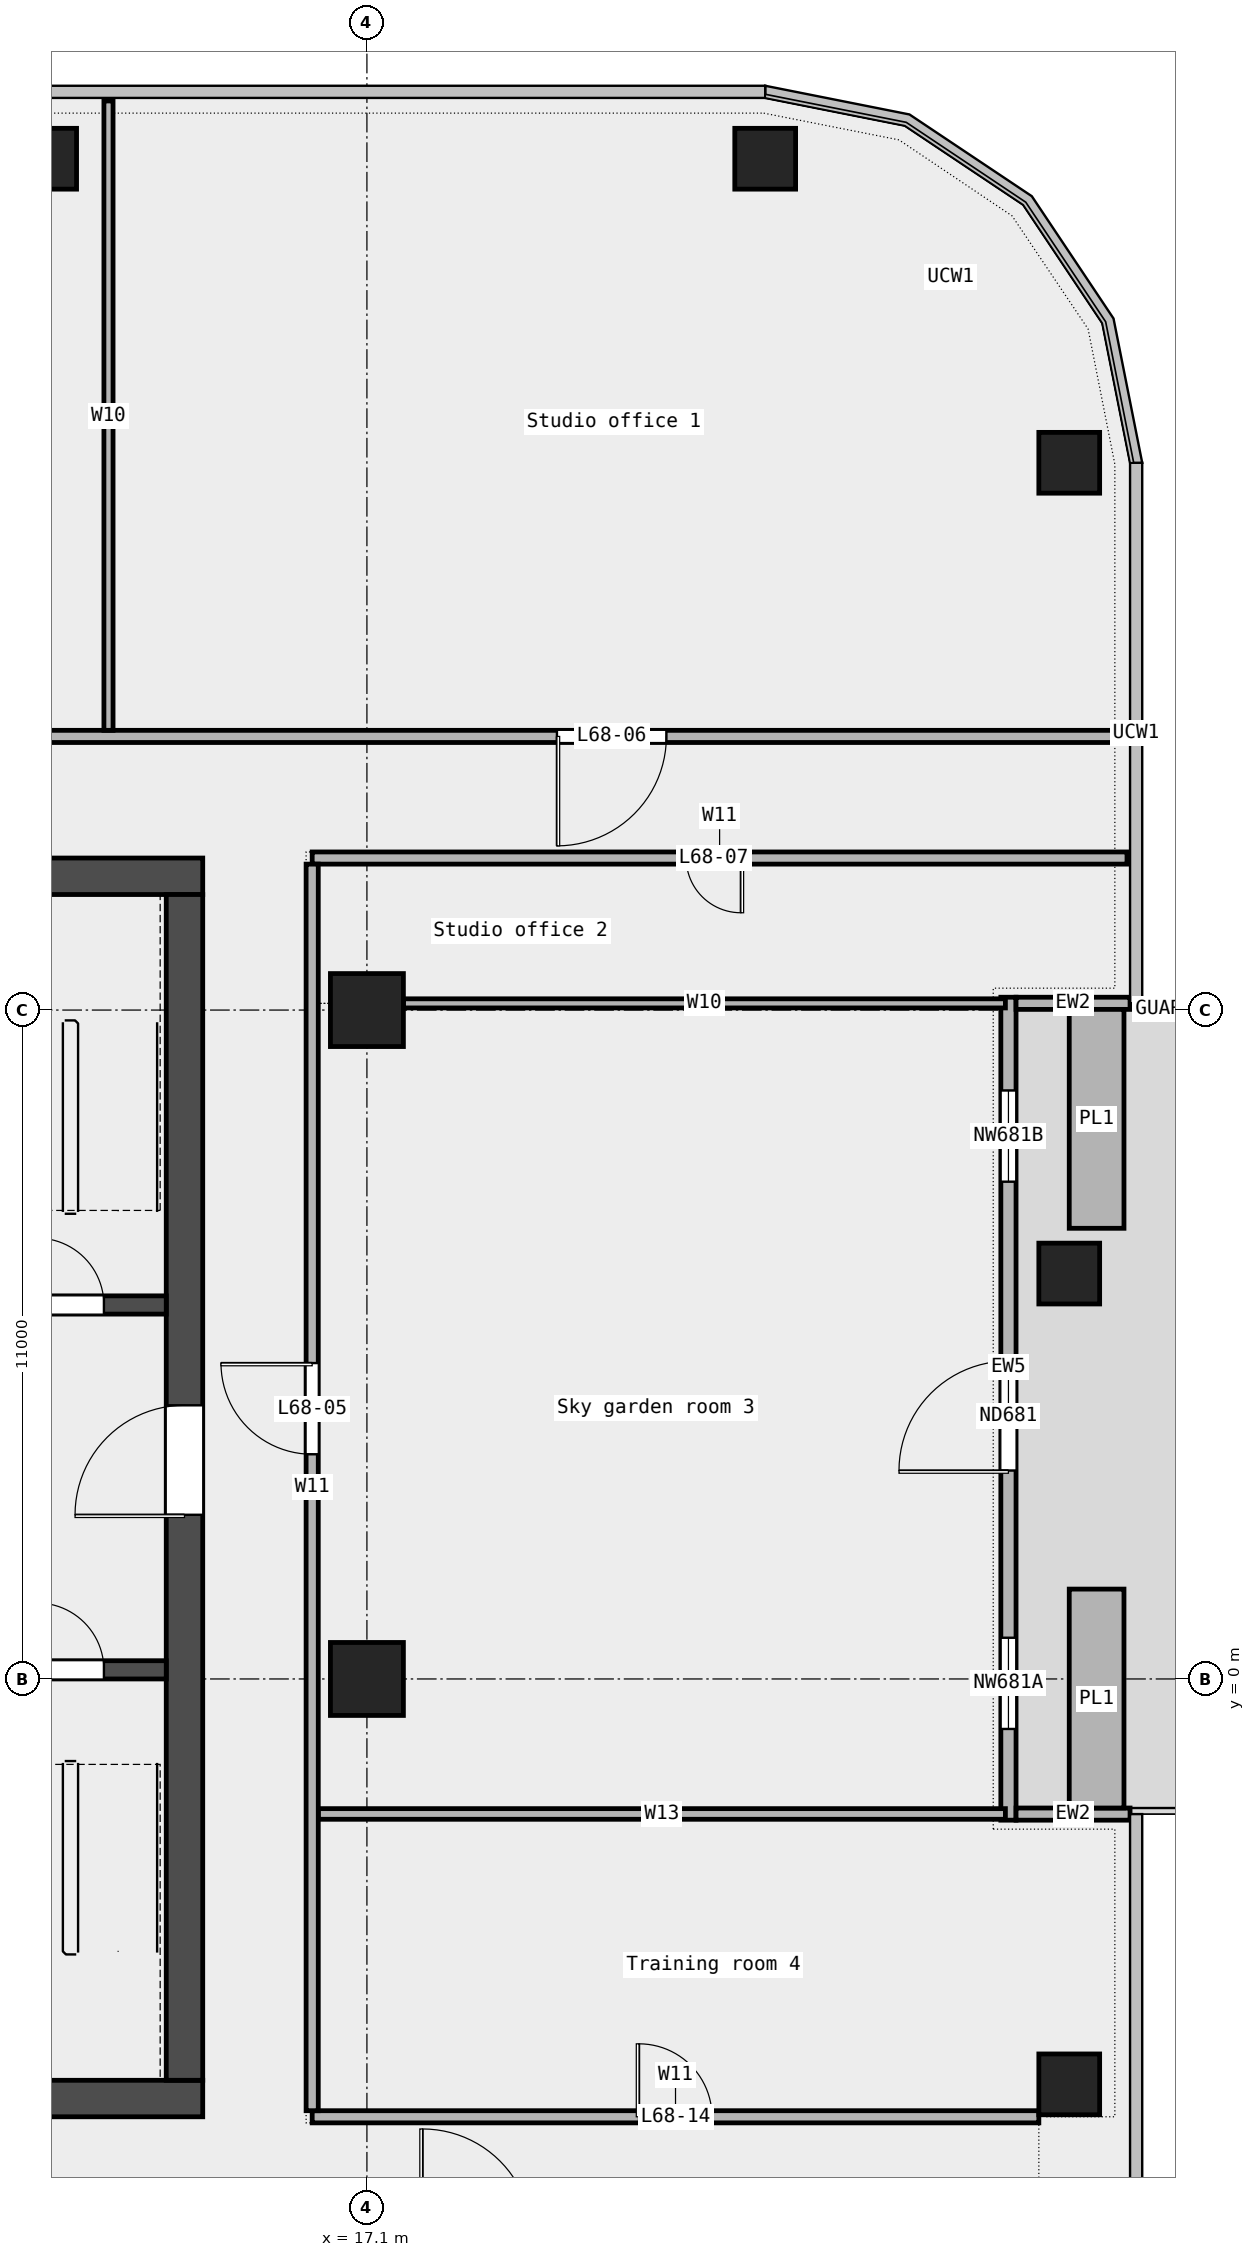
"""IFC4 building model, lengths in metres.
Left out: names, types, materials, properties, quantities, classifications, styles, units other than length and angle.
Written with IfcOpenShell. Run it as: python <this file> out.ifc"""

import sys

from ifc_helpers import new_model, si_unit, direction, frame, frame_2d, origin, origin_2d, place, context, subcontext, project, spatial, rectangle, extrude, element, fill, save


model = new_model("IFC4")
c1 = context("Model", 3, precision=1e-05, world=origin(), true_north=direction((0.0, 1.0)))
c2 = subcontext(c1, "Body", "Model", "MODEL_VIEW")
j1 = project(units=[si_unit("LENGTHUNIT", "METRE"), si_unit("PLANEANGLEUNIT", "RADIAN")], contexts=[c1])
p1 = place(None, origin())
s1 = spatial("IfcSite", under=j1, at=p1, CompositionType="ELEMENT")
p2 = place(p1, origin())
s2 = spatial("IfcBuilding", under=s1, at=p2, CompositionType="ELEMENT")
p3 = place(p2, frame((0.0, 0.0, 311.4)))
s3 = spatial("IfcBuildingStorey", under=s2, at=p3, CompositionType="ELEMENT", Elevation=311.4)
for number, where, z_axis, x_axis in (
    (1, (28.65, -6.667, 0.0), (0.0, 0.0, 1.0), (1.0, 0.0, 0.0)),
    (2, (28.65, 6.667, 0.0), (0.0, 0.0, 1.0), (1.0, 0.0, 0.0)),
    (3, (28.65, 20.0, 0.0), (0.0, 0.0, 1.0), (1.0, 0.0, 0.0)),
    (4, (23.65, 25.0, 0.0), (0.0, 0.0, 1.0), (1.0, 0.0, 0.0)),
    (5, (11.825, 25.0, 0.0), (0.0, 0.0, 1.0), (1.0, 0.0, 0.0)),
):
    element("IfcColumn", number, at=place(p3, frame(where, z_axis=z_axis, x_axis=x_axis)), inside=s3, PredefinedType="COLUMN", context=c2, shape_type="SweptSolid", body=[
        extrude(rectangle(XDim=1.0, YDim=1.0, at=origin_2d()), origin(), (0.0, 0.0, 1.0), 3.4),
    ])
for number, where, z_axis, x_axis in (
    (6, (17.1, 0.0, 0.0), (0.0, 0.0, 1.0), (1.0, 0.0, 0.0)),
    (7, (17.1, 11.0, 0.0), (0.0, 0.0, 1.0), (1.0, 0.0, 0.0)),
):
    element("IfcColumn", number, at=place(p3, frame(where, z_axis=z_axis, x_axis=x_axis)), inside=s3, PredefinedType="COLUMN", context=c2, shape_type="SweptSolid", body=[
        extrude(rectangle(XDim=1.2, YDim=1.2, at=origin_2d()), origin(), (0.0, 0.0, 1.0), 3.4),
    ])
p4 = place(p3, frame((27.65, -2.322, 0.0), z_axis=(0.0, 0.0, 1.0), x_axis=(0.0, 1.0, 0.0)))
e8 = element("IfcWall", 8, at=p4, inside=s3, PredefinedType="STANDARD", context=c2, shape_type="SweptSolid", body=[
    extrude(rectangle(XDim=13.533, YDim=0.25, at=frame_2d((6.767, 0.0))), origin(), (0.0, 0.0, 1.0), 3.4),
])
p5 = place(p4, frame((1.5, 0.0, 0.45)))
e9 = element("IfcOpeningElement", 9, at=p5, cuts=e8, PredefinedType="OPENING", context=c2, shape_type="SweptSolid", body=[
    extrude(rectangle(XDim=1.5, YDim=2.4, at=frame_2d((0.75, 1.2))), frame((0.0, 0.137, 0.0), z_axis=(0.0, -1.0, 0.0), x_axis=(1.0, 0.0, 0.0)), (0.0, 0.0, 1.0), 0.274),
])
p6 = place(p4, frame((5.75, 0.0, 0.0)))
e10 = element("IfcOpeningElement", 10, at=p6, cuts=e8, PredefinedType="OPENING", context=c2, shape_type="SweptSolid", body=[
    extrude(rectangle(XDim=1.8, YDim=2.4, at=frame_2d((0.9, 1.2))), frame((0.0, 0.137, 0.0), z_axis=(0.0, -1.0, 0.0), x_axis=(1.0, 0.0, 0.0)), (0.0, 0.0, 1.0), 0.274),
])
p7 = place(p4, frame((10.5, 0.0, 0.45)))
e11 = element("IfcOpeningElement", 11, at=p7, cuts=e8, PredefinedType="OPENING", context=c2, shape_type="SweptSolid", body=[
    extrude(rectangle(XDim=1.5, YDim=2.4, at=frame_2d((0.75, 1.2))), frame((0.0, 0.137, 0.0), z_axis=(0.0, -1.0, 0.0), x_axis=(1.0, 0.0, 0.0)), (0.0, 0.0, 1.0), 0.274),
])
for number, where, z_axis, x_axis in (
    (12, (29.65, -2.222, 0.0), (0.0, 0.0, 1.0), (-1.0, 0.0, 0.0)),
    (13, (29.65, 11.111, 0.0), (0.0, 0.0, 1.0), (-1.0, 0.0, 0.0)),
):
    element("IfcWall", number, at=place(p3, frame(where, z_axis=z_axis, x_axis=x_axis)), inside=s3, PredefinedType="STANDARD", context=c2, shape_type="SweptSolid", body=[
        extrude(rectangle(XDim=1.875, YDim=0.2, at=frame_2d((0.938, 0.0))), origin(), (0.0, 0.0, 1.0), 3.4),
    ])
for number, where, z_axis, x_axis in (
    (14, (29.1, -2.122, 0.0), (0.0, 0.0, 1.0), (0.0, 1.0, 0.0)),
    (15, (29.1, 7.411, 0.0), (0.0, 0.0, 1.0), (0.0, 1.0, 0.0)),
):
    element("IfcWall", number, at=place(p3, frame(where, z_axis=z_axis, x_axis=x_axis)), inside=s3, PredefinedType="STANDARD", context=c2, shape_type="SweptSolid", body=[
        extrude(rectangle(XDim=3.6, YDim=0.9, at=frame_2d((1.8, 0.0))), origin(), (0.0, 0.0, 1.0), 0.7),
    ])
p8 = place(p3, frame((16.2, -7.2, 0.0), z_axis=(0.0, 0.0, 1.0), x_axis=(1.0, 0.0, 0.0)))
e16 = element("IfcWall", 16, at=p8, inside=s3, PredefinedType="PARTITIONING", context=c2, shape_type="SweptSolid", body=[
    extrude(rectangle(XDim=11.95, YDim=0.2, at=frame_2d((5.975, 0.0))), origin(), (0.0, 0.0, 1.0), 3.4),
])
p9 = place(p8, frame((5.375, 0.0, 0.0)))
e17 = element("IfcOpeningElement", 17, at=p9, cuts=e16, PredefinedType="OPENING", context=c2, shape_type="SweptSolid", body=[
    extrude(rectangle(XDim=1.2, YDim=2.1, at=frame_2d((0.6, 1.05))), frame((0.0, 0.112, 0.0), z_axis=(0.0, -1.0, 0.0), x_axis=(1.0, 0.0, 0.0)), (0.0, 0.0, 1.0), 0.224),
])
p10 = place(p3, frame((16.3, -2.22, 0.0), z_axis=(0.0, 0.0, 1.0), x_axis=(1.0, 0.0, 0.0)))
e18 = element("IfcWall", 18, at=p10, inside=s3, PredefinedType="PARTITIONING", context=c2, shape_type="SweptSolid", body=[
    extrude(rectangle(XDim=11.3, YDim=0.175, at=frame_2d((5.65, 0.0))), origin(), (0.0, 0.0, 1.0), 3.4),
])
p11 = place(p3, frame((17.7, 11.11, 0.0), z_axis=(0.0, 0.0, 1.0), x_axis=(1.0, 0.0, 0.0)))
e19 = element("IfcWall", 19, at=p11, inside=s3, PredefinedType="PARTITIONING", context=c2, shape_type="SweptSolid", body=[
    extrude(rectangle(XDim=9.9, YDim=0.15, at=frame_2d((4.95, 0.0))), origin(), (0.0, 0.0, 1.0), 3.4),
])
p12 = place(p3, frame((16.2, 13.5, 0.0), z_axis=(0.0, 0.0, 1.0), x_axis=(1.0, 0.0, 0.0)))
e20 = element("IfcWall", 20, at=p12, inside=s3, PredefinedType="PARTITIONING", context=c2, shape_type="SweptSolid", body=[
    extrude(rectangle(XDim=13.4, YDim=0.2, at=frame_2d((6.7, 0.0))), origin(), (0.0, 0.0, 1.0), 3.4),
])
p13 = place(p12, frame((6.15, 0.0, 0.0)))
e21 = element("IfcOpeningElement", 21, at=p13, cuts=e20, PredefinedType="OPENING", context=c2, shape_type="SweptSolid", body=[
    extrude(rectangle(XDim=0.9, YDim=2.1, at=frame_2d((0.45, 1.05))), frame((0.0, 0.112, 0.0), z_axis=(0.0, -1.0, 0.0), x_axis=(1.0, 0.0, 0.0)), (0.0, 0.0, 1.0), 0.224),
])
p14 = place(p3, frame((-29.6, 15.5, 0.0), z_axis=(0.0, 0.0, 1.0), x_axis=(1.0, 0.0, 0.0)))
e22 = element("IfcWall", 22, at=p14, inside=s3, PredefinedType="PARTITIONING", context=c2, shape_type="SweptSolid", body=[
    extrude(rectangle(XDim=59.2, YDim=0.2, at=frame_2d((29.6, 0.0))), origin(), (0.0, 0.0, 1.0), 3.4),
])
p15 = place(p14, frame((20.25, 0.0, 0.0)))
e23 = element("IfcOpeningElement", 23, at=p15, cuts=e22, PredefinedType="OPENING", context=c2, shape_type="SweptSolid", body=[
    extrude(rectangle(XDim=1.5, YDim=2.1, at=frame_2d((0.75, 1.05))), frame((0.0, 0.112, 0.0), z_axis=(0.0, -1.0, 0.0), x_axis=(1.0, 0.0, 0.0)), (0.0, 0.0, 1.0), 0.224),
])
p16 = place(p14, frame((49.825, 0.0, 0.0)))
e24 = element("IfcOpeningElement", 24, at=p16, cuts=e22, PredefinedType="OPENING", context=c2, shape_type="SweptSolid", body=[
    extrude(rectangle(XDim=1.8, YDim=2.1, at=frame_2d((0.9, 1.05))), frame((0.0, 0.112, 0.0), z_axis=(0.0, -1.0, 0.0), x_axis=(1.0, 0.0, 0.0)), (0.0, 0.0, 1.0), 0.224),
])
p17 = place(p14, frame((34.05, 0.0, 0.0)))
e25 = element("IfcOpeningElement", 25, at=p17, cuts=e22, PredefinedType="OPENING", context=c2, shape_type="SweptSolid", body=[
    extrude(rectangle(XDim=1.8, YDim=2.1, at=frame_2d((0.9, 1.05))), frame((0.0, 0.112, 0.0), z_axis=(0.0, -1.0, 0.0), x_axis=(1.0, 0.0, 0.0)), (0.0, 0.0, 1.0), 0.224),
])
p18 = place(p14, frame((6.625, 0.0, 0.0)))
e26 = element("IfcOpeningElement", 26, at=p18, cuts=e22, PredefinedType="OPENING", context=c2, shape_type="SweptSolid", body=[
    extrude(rectangle(XDim=1.5, YDim=2.1, at=frame_2d((0.75, 1.05))), frame((0.0, 0.112, 0.0), z_axis=(0.0, -1.0, 0.0), x_axis=(1.0, 0.0, 0.0)), (0.0, 0.0, 1.0), 0.224),
])
p19 = place(p3, frame((12.85, 15.6, 0.0), z_axis=(0.0, 0.0, 1.0), x_axis=(0.0, 1.0, 0.0)))
e27 = element("IfcWall", 27, at=p19, inside=s3, PredefinedType="PARTITIONING", context=c2, shape_type="SweptSolid", body=[
    extrude(rectangle(XDim=10.35, YDim=0.15, at=frame_2d((5.175, 0.0))), origin(), (0.0, 0.0, 1.0), 3.4),
])
p20 = place(p3, frame((16.2, -7.1, 0.0), z_axis=(0.0, 0.0, 1.0), x_axis=(0.0, 1.0, 0.0)))
e28 = element("IfcWall", 28, at=p20, inside=s3, PredefinedType="PARTITIONING", context=c2, shape_type="SweptSolid", body=[
    extrude(rectangle(XDim=20.5, YDim=0.2, at=frame_2d((10.25, 0.0))), origin(), (0.0, 0.0, 1.0), 3.4),
])
p21 = place(p20, frame((10.795, 0.0, 0.0)))
e29 = element("IfcOpeningElement", 29, at=p21, cuts=e28, PredefinedType="OPENING", context=c2, shape_type="SweptSolid", body=[
    extrude(rectangle(XDim=1.5, YDim=2.1, at=frame_2d((0.75, 1.05))), frame((0.0, 0.112, 0.0), z_axis=(0.0, -1.0, 0.0), x_axis=(1.0, 0.0, 0.0)), (0.0, 0.0, 1.0), 0.224),
])
p22 = place(p3, frame((-14.4, -6.9, 0.0), z_axis=(0.0, 0.0, 1.0), x_axis=(1.0, 0.0, 0.0)))
e30 = element("IfcWall", 30, at=p22, inside=s3, PredefinedType="SHEAR", context=c2, shape_type="SweptSolid", body=[
    extrude(rectangle(XDim=28.8, YDim=0.6, at=frame_2d((14.4, 0.0))), origin(), (0.0, 0.0, 1.0), 3.7),
])
p23 = place(p22, frame((4.337, 0.0, 0.0)))
e31 = element("IfcOpeningElement", 31, at=p23, cuts=e30, PredefinedType="OPENING", context=c2, shape_type="SweptSolid", body=[
    extrude(rectangle(XDim=1.0, YDim=2.1, at=frame_2d((0.5, 1.05))), frame((0.0, 0.312, 0.0), z_axis=(0.0, -1.0, 0.0), x_axis=(1.0, 0.0, 0.0)), (0.0, 0.0, 1.0), 0.624),
])
p24 = place(p22, frame((6.212, 0.0, 0.0)))
e32 = element("IfcOpeningElement", 32, at=p24, cuts=e30, PredefinedType="OPENING", context=c2, shape_type="SweptSolid", body=[
    extrude(rectangle(XDim=1.0, YDim=2.1, at=frame_2d((0.5, 1.05))), frame((0.0, 0.312, 0.0), z_axis=(0.0, -1.0, 0.0), x_axis=(1.0, 0.0, 0.0)), (0.0, 0.0, 1.0), 0.624),
])
p25 = place(p22, frame((10.8, 0.0, 0.0)))
e33 = element("IfcOpeningElement", 33, at=p25, cuts=e30, PredefinedType="OPENING", context=c2, shape_type="SweptSolid", body=[
    extrude(rectangle(XDim=1.2, YDim=2.1, at=frame_2d((0.6, 1.05))), frame((0.0, 0.312, 0.0), z_axis=(0.0, -1.0, 0.0), x_axis=(1.0, 0.0, 0.0)), (0.0, 0.0, 1.0), 0.624),
])
p26 = place(p22, frame((15.587, 0.0, 0.0)))
e34 = element("IfcOpeningElement", 34, at=p26, cuts=e30, PredefinedType="OPENING", context=c2, shape_type="SweptSolid", body=[
    extrude(rectangle(XDim=1.0, YDim=2.1, at=frame_2d((0.5, 1.05))), frame((0.0, 0.312, 0.0), z_axis=(0.0, -1.0, 0.0), x_axis=(1.0, 0.0, 0.0)), (0.0, 0.0, 1.0), 0.624),
])
p27 = place(p22, frame((18.75, 0.0, 0.0)))
e35 = element("IfcOpeningElement", 35, at=p27, cuts=e30, PredefinedType="OPENING", context=c2, shape_type="SweptSolid", body=[
    extrude(rectangle(XDim=1.8, YDim=2.1, at=frame_2d((0.9, 1.05))), frame((0.0, 0.312, 0.0), z_axis=(0.0, -1.0, 0.0), x_axis=(1.0, 0.0, 0.0)), (0.0, 0.0, 1.0), 0.624),
])
p28 = place(p22, frame((23.087, 0.0, 0.0)))
e36 = element("IfcOpeningElement", 36, at=p28, cuts=e30, PredefinedType="OPENING", context=c2, shape_type="SweptSolid", body=[
    extrude(rectangle(XDim=1.0, YDim=2.1, at=frame_2d((0.5, 1.05))), frame((0.0, 0.312, 0.0), z_axis=(0.0, -1.0, 0.0), x_axis=(1.0, 0.0, 0.0)), (0.0, 0.0, 1.0), 0.624),
])
p29 = place(p3, frame((-14.4, 13.2, 0.0), z_axis=(0.0, 0.0, 1.0), x_axis=(1.0, 0.0, 0.0)))
e37 = element("IfcWall", 37, at=p29, inside=s3, PredefinedType="SHEAR", context=c2, shape_type="SweptSolid", body=[
    extrude(rectangle(XDim=28.8, YDim=0.6, at=frame_2d((14.4, 0.0))), origin(), (0.0, 0.0, 1.0), 3.7),
])
p30 = place(p29, frame((6.3, 0.0, 0.0)))
e38 = element("IfcOpeningElement", 38, at=p30, cuts=e37, PredefinedType="OPENING", context=c2, shape_type="SweptSolid", body=[
    extrude(rectangle(XDim=1.2, YDim=2.1, at=frame_2d((0.6, 1.05))), frame((0.0, 0.312, 0.0), z_axis=(0.0, -1.0, 0.0), x_axis=(1.0, 0.0, 0.0)), (0.0, 0.0, 1.0), 0.624),
])
p31 = place(p29, frame((21.3, 0.0, 0.0)))
e39 = element("IfcOpeningElement", 39, at=p31, cuts=e37, PredefinedType="OPENING", context=c2, shape_type="SweptSolid", body=[
    extrude(rectangle(XDim=1.2, YDim=2.1, at=frame_2d((0.6, 1.05))), frame((0.0, 0.312, 0.0), z_axis=(0.0, -1.0, 0.0), x_axis=(1.0, 0.0, 0.0)), (0.0, 0.0, 1.0), 0.624),
])
p32 = place(p3, frame((14.1, -6.6, 0.0), z_axis=(0.0, 0.0, 1.0), x_axis=(0.0, 1.0, 0.0)))
e40 = element("IfcWall", 40, at=p32, inside=s3, PredefinedType="SHEAR", context=c2, shape_type="SweptSolid", body=[
    extrude(rectangle(XDim=19.5, YDim=0.6, at=frame_2d((9.75, 0.0))), origin(), (0.0, 0.0, 1.0), 3.7),
])
p33 = place(p32, frame((9.3, 0.0, 0.0)))
e41 = element("IfcOpeningElement", 41, at=p33, cuts=e40, PredefinedType="OPENING", context=c2, shape_type="SweptSolid", body=[
    extrude(rectangle(XDim=1.8, YDim=2.1, at=frame_2d((0.9, 1.05))), frame((0.0, 0.312, 0.0), z_axis=(0.0, -1.0, 0.0), x_axis=(1.0, 0.0, 0.0)), (0.0, 0.0, 1.0), 0.624),
])
p34 = place(p3, frame((10.65, 0.15, 0.0), z_axis=(0.0, 0.0, 1.0), x_axis=(1.0, 0.0, 0.0)))
e42 = element("IfcWall", 42, at=p34, inside=s3, PredefinedType="SOLIDWALL", context=c2, shape_type="SweptSolid", body=[
    extrude(rectangle(XDim=3.15, YDim=0.3, at=frame_2d((1.575, 0.0))), origin(), (0.0, 0.0, 1.0), 3.7),
])
p35 = place(p34, frame((1.025, 0.0, 0.0)))
e43 = element("IfcOpeningElement", 43, at=p35, cuts=e42, PredefinedType="OPENING", context=c2, shape_type="SweptSolid", body=[
    extrude(rectangle(XDim=1.1, YDim=2.1, at=frame_2d((0.55, 1.05))), frame((0.0, 0.162, 0.0), z_axis=(0.0, -1.0, 0.0), x_axis=(1.0, 0.0, 0.0)), (0.0, 0.0, 1.0), 0.324),
])
p36 = place(p3, frame((10.65, 6.15, 0.0), z_axis=(0.0, 0.0, 1.0), x_axis=(1.0, 0.0, 0.0)))
e44 = element("IfcWall", 44, at=p36, inside=s3, PredefinedType="SOLIDWALL", context=c2, shape_type="SweptSolid", body=[
    extrude(rectangle(XDim=3.15, YDim=0.3, at=frame_2d((1.575, 0.0))), origin(), (0.0, 0.0, 1.0), 3.7),
])
p37 = place(p36, frame((1.025, 0.0, 0.0)))
e45 = element("IfcOpeningElement", 45, at=p37, cuts=e44, PredefinedType="OPENING", context=c2, shape_type="SweptSolid", body=[
    extrude(rectangle(XDim=1.1, YDim=2.1, at=frame_2d((0.55, 1.05))), frame((0.0, 0.162, 0.0), z_axis=(0.0, -1.0, 0.0), x_axis=(1.0, 0.0, 0.0)), (0.0, 0.0, 1.0), 0.324),
])
p38 = place(p5, origin())
e46 = element("IfcWindow", 46, at=p38, inside=s3, PartitioningType="SINGLE_PANEL", PredefinedType="WINDOW", context=c2, shape_type="SweptSolid", body=[
    extrude(rectangle(XDim=1.5, YDim=2.4, at=frame_2d((0.75, 1.2))), frame((0.0, 0.03, 0.0), z_axis=(0.0, -1.0, 0.0), x_axis=(1.0, 0.0, 0.0)), (0.0, 0.0, 1.0), 0.06),
])
fill(e9, e46)
p39 = place(p6, origin())
e47 = element("IfcDoor", 47, at=p39, inside=s3, OperationType="DOUBLE_DOOR_SINGLE_SWING", PredefinedType="DOOR", context=c2, shape_type="SweptSolid", body=[
    extrude(rectangle(XDim=1.8, YDim=2.4, at=frame_2d((0.9, 1.2))), frame((0.0, 0.025, 0.0), z_axis=(0.0, -1.0, 0.0), x_axis=(1.0, 0.0, 0.0)), (0.0, 0.0, 1.0), 0.05),
])
fill(e10, e47)
p40 = place(p7, origin())
e48 = element("IfcWindow", 48, at=p40, inside=s3, PartitioningType="SINGLE_PANEL", PredefinedType="WINDOW", context=c2, shape_type="SweptSolid", body=[
    extrude(rectangle(XDim=1.5, YDim=2.4, at=frame_2d((0.75, 1.2))), frame((0.0, 0.03, 0.0), z_axis=(0.0, -1.0, 0.0), x_axis=(1.0, 0.0, 0.0)), (0.0, 0.0, 1.0), 0.06),
])
fill(e11, e48)
p41 = place(p21, origin())
e49 = element("IfcDoor", 49, at=p41, inside=s3, OperationType="DOUBLE_DOOR_SINGLE_SWING", PredefinedType="DOOR", context=c2, shape_type="SweptSolid", body=[
    extrude(rectangle(XDim=1.5, YDim=2.1, at=frame_2d((0.75, 1.05))), frame((0.0, 0.025, 0.0), z_axis=(0.0, -1.0, 0.0), x_axis=(1.0, 0.0, 0.0)), (0.0, 0.0, 1.0), 0.05),
])
fill(e29, e49)
p42 = place(p16, origin())
e50 = element("IfcDoor", 50, at=p42, inside=s3, OperationType="DOUBLE_DOOR_SINGLE_SWING", PredefinedType="DOOR", context=c2, shape_type="SweptSolid", body=[
    extrude(rectangle(XDim=1.8, YDim=2.1, at=frame_2d((0.9, 1.05))), frame((0.0, 0.025, 0.0), z_axis=(0.0, -1.0, 0.0), x_axis=(1.0, 0.0, 0.0)), (0.0, 0.0, 1.0), 0.05),
])
fill(e24, e50)
p43 = place(p13, origin())
e51 = element("IfcDoor", 51, at=p43, inside=s3, OperationType="SINGLE_SWING_LEFT", PredefinedType="DOOR", context=c2, shape_type="SweptSolid", body=[
    extrude(rectangle(XDim=0.9, YDim=2.1, at=frame_2d((0.45, 1.05))), frame((0.0, 0.025, 0.0), z_axis=(0.0, -1.0, 0.0), x_axis=(1.0, 0.0, 0.0)), (0.0, 0.0, 1.0), 0.05),
])
fill(e21, e51)
p44 = place(p9, origin())
e52 = element("IfcDoor", 52, at=p44, inside=s3, OperationType="SINGLE_SWING_LEFT", PredefinedType="DOOR", context=c2, shape_type="SweptSolid", body=[
    extrude(rectangle(XDim=1.2, YDim=2.1, at=frame_2d((0.6, 1.05))), frame((0.0, 0.025, 0.0), z_axis=(0.0, -1.0, 0.0), x_axis=(1.0, 0.0, 0.0)), (0.0, 0.0, 1.0), 0.05),
])
fill(e17, e52)
p45 = place(p35, origin())
e53 = element("IfcDoor", 53, at=p45, inside=s3, OperationType="SINGLE_SWING_RIGHT", PredefinedType="DOOR", context=c2, shape_type="SweptSolid", body=[
    extrude(rectangle(XDim=1.1, YDim=2.1, at=frame_2d((0.55, 1.05))), frame((0.0, 0.025, 0.0), z_axis=(0.0, -1.0, 0.0), x_axis=(1.0, 0.0, 0.0)), (0.0, 0.0, 1.0), 0.05),
])
fill(e43, e53)
p46 = place(p37, origin())
e54 = element("IfcDoor", 54, at=p46, inside=s3, OperationType="SINGLE_SWING_RIGHT", PredefinedType="DOOR", context=c2, shape_type="SweptSolid", body=[
    extrude(rectangle(XDim=1.1, YDim=2.1, at=frame_2d((0.55, 1.05))), frame((0.0, 0.025, 0.0), z_axis=(0.0, -1.0, 0.0), x_axis=(1.0, 0.0, 0.0)), (0.0, 0.0, 1.0), 0.05),
])
fill(e45, e54)
p47 = place(p33, origin())
e55 = element("IfcDoor", 55, at=p47, inside=s3, OperationType="DOUBLE_DOOR_SINGLE_SWING", PredefinedType="DOOR", context=c2, shape_type="SweptSolid", body=[
    extrude(rectangle(XDim=1.8, YDim=2.1, at=frame_2d((0.9, 1.05))), frame((0.0, 0.025, 0.0), z_axis=(0.0, -1.0, 0.0), x_axis=(1.0, 0.0, 0.0)), (0.0, 0.0, 1.0), 0.05),
])
fill(e41, e55)
save(model, sys.argv[1])
